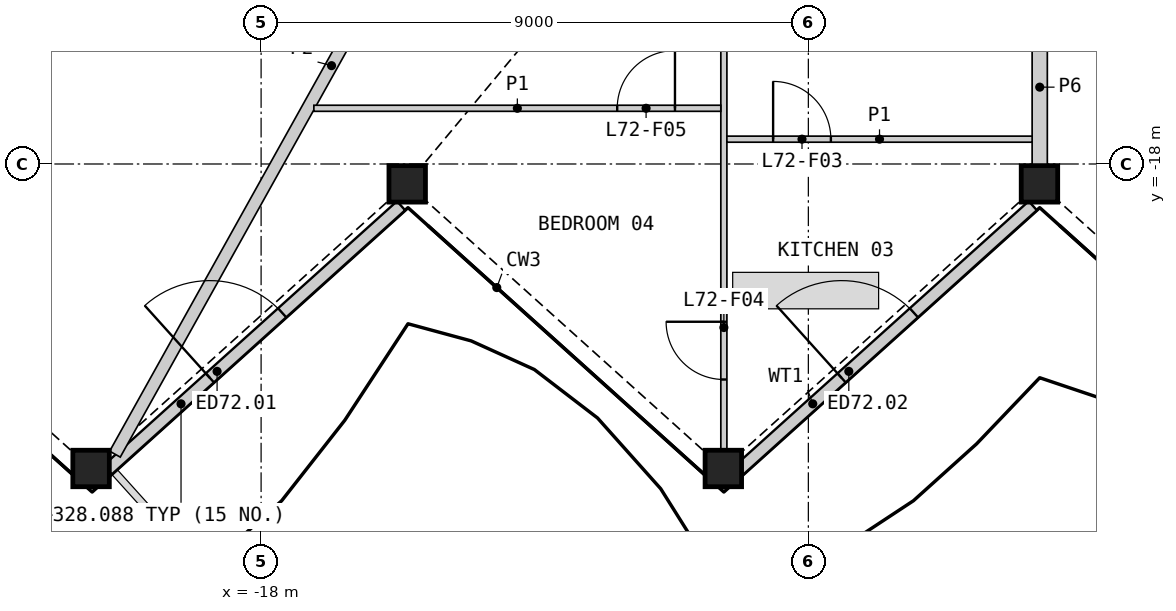
"""IFC4 building model, lengths in metres.
Left out: names, types, materials, properties, quantities, classifications, styles, units other than length and angle.
Written with IfcOpenShell. Run it as: python <this file> out.ifc"""

import sys

from ifc_helpers import new_model, si_unit, direction, frame, frame_2d, origin, origin_2d, place, context, subcontext, project, spatial, rectangle, hollow_rectangle, extrude, element, fill, save


model = new_model("IFC4")
c1 = context("Model", 3, precision=1e-05, world=origin(), true_north=direction((0.0, 1.0)))
c2 = subcontext(c1, "Body", "Model", "MODEL_VIEW")
j1 = project(units=[si_unit("LENGTHUNIT", "METRE"), si_unit("PLANEANGLEUNIT", "RADIAN")], contexts=[c1])
p1 = place(None, origin())
s1 = spatial("IfcSite", under=j1, at=p1, CompositionType="ELEMENT")
p2 = place(p1, origin())
s2 = spatial("IfcBuilding", under=s1, at=p2, CompositionType="ELEMENT")
p3 = place(p2, frame((0.0, 0.0, 325.6)))
s3 = spatial("IfcBuildingStorey", under=s2, at=p3, CompositionType="ELEMENT", Elevation=325.6)
for number, where, z_axis, x_axis in (
    (1, (-20.796, -23.008, 0.0), (0.0, 0.0, 1.0), (1.0, 0.0, 0.0)),
    (2, (-15.597, -18.327, 0.0), (0.0, 0.0, 1.0), (1.0, 0.0, 0.0)),
    (3, (-10.398, -23.008, 0.0), (0.0, 0.0, 1.0), (1.0, 0.0, 0.0)),
    (4, (-5.199, -18.327, 0.0), (0.0, 0.0, 1.0), (1.0, 0.0, 0.0)),
):
    element("IfcColumn", number, at=place(p3, frame(where, z_axis=z_axis, x_axis=x_axis)), inside=s3, PredefinedType="COLUMN", context=c2, shape_type="SweptSolid", body=[
        extrude(hollow_rectangle(XDim=0.6, YDim=0.6, WallThickness=0.04, at=origin_2d()), origin(), (0.0, 0.0, 1.0), 3.4),
    ])
p4 = place(p3, frame((-20.523, -23.031, 0.0), z_axis=(0.0, 0.0, 1.0), x_axis=(0.743138937876, 0.669137145145, 0.0)))
e5 = element("IfcWall", 5, at=p4, inside=s3, PredefinedType="SOLIDWALL", context=c2, shape_type="SweptSolid", body=[
    extrude(rectangle(XDim=6.493, YDim=0.2, at=frame_2d((3.246, 0.0))), origin(), (0.0, 0.0, 1.0), 2.488),
])
p5 = place(p4, frame((2.261, 0.0, 0.0)))
e6 = element("IfcOpeningElement", 6, at=p5, cuts=e5, PredefinedType="OPENING", context=c2, shape_type="SweptSolid", body=[
    extrude(rectangle(XDim=1.6, YDim=2.25, at=frame_2d((0.8, 1.125))), frame((0.0, 0.11, 0.0), z_axis=(0.0, -1.0, 0.0), x_axis=(1.0, 0.0, 0.0)), (0.0, 0.0, 1.0), 0.22),
])
p6 = place(p3, frame((-10.134, -23.031, 0.0), z_axis=(0.0, 0.0, 1.0), x_axis=(0.743138937876, 0.669137145145, 0.0)))
e7 = element("IfcWall", 7, at=p6, inside=s3, PredefinedType="SOLIDWALL", context=c2, shape_type="SweptSolid", body=[
    extrude(rectangle(XDim=6.493, YDim=0.2, at=frame_2d((3.246, 0.0))), origin(), (0.0, 0.0, 1.0), 2.488),
])
p7 = place(p6, frame((2.261, 0.0, 0.0)))
e8 = element("IfcOpeningElement", 8, at=p7, cuts=e7, PredefinedType="OPENING", context=c2, shape_type="SweptSolid", body=[
    extrude(rectangle(XDim=1.6, YDim=2.25, at=frame_2d((0.8, 1.125))), frame((0.0, 0.11, 0.0), z_axis=(0.0, -1.0, 0.0), x_axis=(1.0, 0.0, 0.0)), (0.0, 0.0, 1.0), 0.22),
])
p8 = place(p3, frame((-5.195, -18.017, 0.0), z_axis=(0.0, 0.0, 1.0), x_axis=(0.0, 1.0, 0.0)))
e9 = element("IfcWall", 9, at=p8, inside=s3, PredefinedType="PARTITIONING", context=c2, shape_type="SweptSolid", body=[
    extrude(rectangle(XDim=2.561, YDim=0.25, at=frame_2d((1.281, 0.0))), origin(), (0.0, 0.0, 1.0), 2.33),
])
p9 = place(p3, frame((-20.404, -22.772, 0.0), z_axis=(0.0, 0.0, 1.0), x_axis=(0.486917529285, 0.873447949036, 0.0)))
e10 = element("IfcWall", 10, at=p9, inside=s3, PredefinedType="PARTITIONING", context=c2, shape_type="SweptSolid", body=[
    extrude(rectangle(XDim=14.631, YDim=0.2, at=frame_2d((7.315, 0.0))), origin(), (0.0, 0.0, 1.0), 2.33),
])
p10 = place(p3, frame((-10.389, -22.698, 0.0), z_axis=(0.0, 0.0, 1.0), x_axis=(0.0, 1.0, 0.0)))
e11 = element("IfcWall", 11, at=p10, inside=s3, PredefinedType="PARTITIONING", context=c2, shape_type="SweptSolid", body=[
    extrude(rectangle(XDim=12.692, YDim=0.1, at=frame_2d((6.346, 0.0))), origin(), (0.0, 0.0, 1.0), 2.33),
])
p11 = place(p10, frame((1.153, 0.0, 0.0)))
e12 = element("IfcOpeningElement", 12, at=p11, cuts=e11, PredefinedType="OPENING", context=c2, shape_type="SweptSolid", body=[
    extrude(rectangle(XDim=0.95, YDim=2.1, at=frame_2d((0.475, 1.05))), frame((0.0, 0.06, 0.0), z_axis=(0.0, -1.0, 0.0), x_axis=(1.0, 0.0, 0.0)), (0.0, 0.0, 1.0), 0.12),
])
p12 = place(p3, frame((-17.132, -17.084, 0.0), z_axis=(0.0, 0.0, 1.0), x_axis=(1.0, 0.0, 0.0)))
e13 = element("IfcWall", 13, at=p12, inside=s3, PredefinedType="PARTITIONING", context=c2, shape_type="SweptSolid", body=[
    extrude(rectangle(XDim=6.693, YDim=0.1, at=frame_2d((3.346, 0.0))), origin(), (0.0, 0.0, 1.0), 2.33),
])
p13 = place(p12, frame((4.989, 0.0, 0.0)))
e14 = element("IfcOpeningElement", 14, at=p13, cuts=e13, PredefinedType="OPENING", context=c2, shape_type="SweptSolid", body=[
    extrude(rectangle(XDim=0.95, YDim=2.1, at=frame_2d((0.475, 1.05))), frame((0.0, 0.06, 0.0), z_axis=(0.0, -1.0, 0.0), x_axis=(1.0, 0.0, 0.0)), (0.0, 0.0, 1.0), 0.12),
])
p14 = place(p3, frame((-10.339, -17.592, 0.0), z_axis=(0.0, 0.0, 1.0), x_axis=(1.0, 0.0, 0.0)))
e15 = element("IfcWall", 15, at=p14, inside=s3, PredefinedType="PARTITIONING", context=c2, shape_type="SweptSolid", body=[
    extrude(rectangle(XDim=5.02, YDim=0.1, at=frame_2d((2.51, 0.0))), origin(), (0.0, 0.0, 1.0), 2.33),
])
p15 = place(p14, frame((0.76, 0.0, 0.0)))
e16 = element("IfcOpeningElement", 16, at=p15, cuts=e15, PredefinedType="OPENING", context=c2, shape_type="SweptSolid", body=[
    extrude(rectangle(XDim=0.95, YDim=2.1, at=frame_2d((0.475, 1.05))), frame((0.0, 0.06, 0.0), z_axis=(0.0, -1.0, 0.0), x_axis=(1.0, 0.0, 0.0)), (0.0, 0.0, 1.0), 0.12),
])
p16 = place(p5, origin())
e17 = element("IfcDoor", 17, at=p16, inside=s3, OperationType="DOUBLE_DOOR_SINGLE_SWING", PredefinedType="DOOR", context=c2, shape_type="SweptSolid", body=[
    extrude(rectangle(XDim=1.6, YDim=2.25, at=frame_2d((0.8, 1.125))), frame((0.0, 0.025, 0.0), z_axis=(0.0, -1.0, 0.0), x_axis=(1.0, 0.0, 0.0)), (0.0, 0.0, 1.0), 0.05),
])
fill(e6, e17)
p17 = place(p7, origin())
e18 = element("IfcDoor", 18, at=p17, inside=s3, OperationType="DOUBLE_DOOR_SINGLE_SWING", PredefinedType="DOOR", context=c2, shape_type="SweptSolid", body=[
    extrude(rectangle(XDim=1.6, YDim=2.25, at=frame_2d((0.8, 1.125))), frame((0.0, 0.025, 0.0), z_axis=(0.0, -1.0, 0.0), x_axis=(1.0, 0.0, 0.0)), (0.0, 0.0, 1.0), 0.05),
])
fill(e8, e18)
p18 = place(p15, origin())
e19 = element("IfcDoor", 19, at=p18, inside=s3, OperationType="SINGLE_SWING_LEFT", PredefinedType="DOOR", context=c2, shape_type="SweptSolid", body=[
    extrude(rectangle(XDim=0.95, YDim=2.1, at=frame_2d((0.475, 1.05))), frame((0.0, 0.025, 0.0), z_axis=(0.0, -1.0, 0.0), x_axis=(1.0, 0.0, 0.0)), (0.0, 0.0, 1.0), 0.05),
])
fill(e16, e19)
p19 = place(p11, origin())
e20 = element("IfcDoor", 20, at=p19, inside=s3, OperationType="SINGLE_SWING_RIGHT", PredefinedType="DOOR", context=c2, shape_type="SweptSolid", body=[
    extrude(rectangle(XDim=0.95, YDim=2.1, at=frame_2d((0.475, 1.05))), frame((0.0, 0.025, 0.0), z_axis=(0.0, -1.0, 0.0), x_axis=(1.0, 0.0, 0.0)), (0.0, 0.0, 1.0), 0.05),
])
fill(e12, e20)
p20 = place(p13, origin())
e21 = element("IfcDoor", 21, at=p20, inside=s3, OperationType="SINGLE_SWING_RIGHT", PredefinedType="DOOR", context=c2, shape_type="SweptSolid", body=[
    extrude(rectangle(XDim=0.95, YDim=2.1, at=frame_2d((0.475, 1.05))), frame((0.0, 0.025, 0.0), z_axis=(0.0, -1.0, 0.0), x_axis=(1.0, 0.0, 0.0)), (0.0, 0.0, 1.0), 0.05),
])
fill(e14, e21)
save(model, sys.argv[1])
